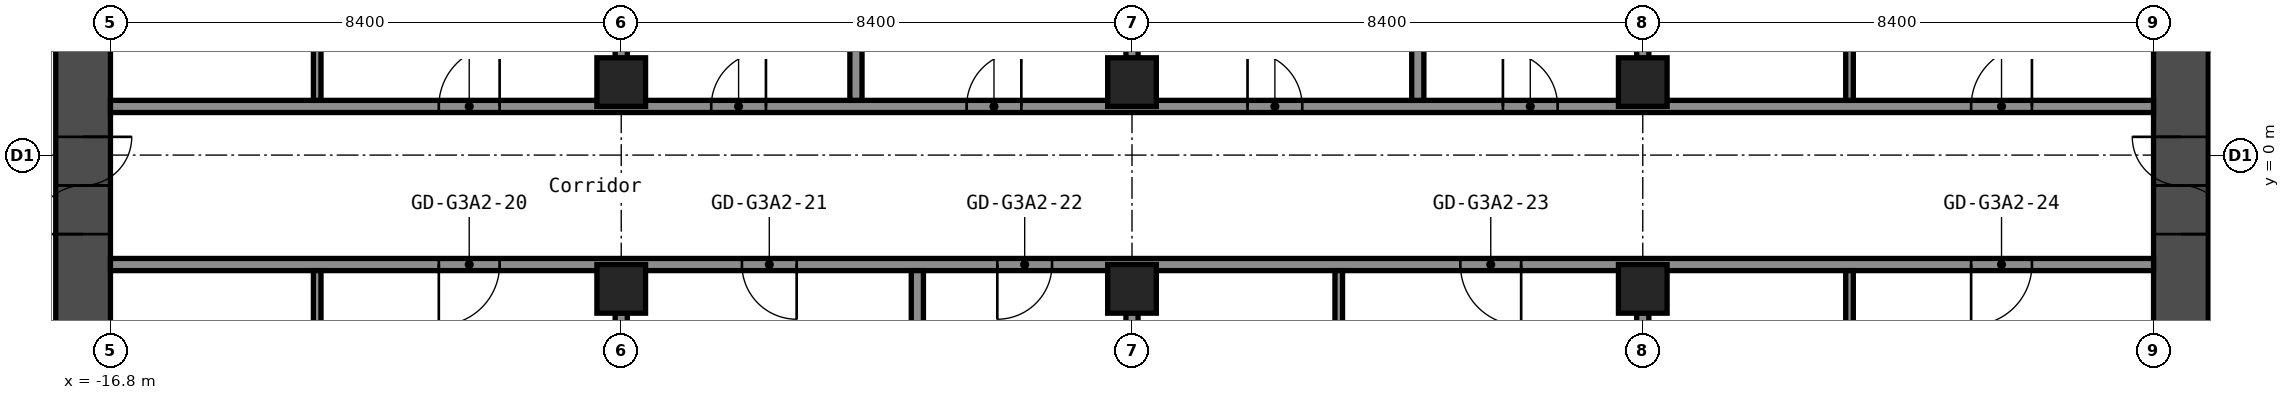
"""IFC4 building model, lengths in metres.
Left out: names, types, materials, properties, quantities, classifications, styles, units other than length and angle.
Written with IfcOpenShell. Run it as: python <this file> out.ifc"""

import sys

from ifc_helpers import new_model, si_unit, direction, frame, frame_2d, origin, origin_2d, place, context, subcontext, project, spatial, rectangle, hollow_rectangle, extrude, element, fill, save


model = new_model("IFC4")
c1 = context("Model", 3, precision=1e-05, world=origin(), true_north=direction((0.0, 1.0)))
c2 = subcontext(c1, "Body", "Model", "MODEL_VIEW")
j1 = project(units=[si_unit("LENGTHUNIT", "METRE"), si_unit("PLANEANGLEUNIT", "RADIAN")], contexts=[c1])
p1 = place(None, origin())
s1 = spatial("IfcSite", under=j1, at=p1, CompositionType="ELEMENT")
p2 = place(p1, origin())
s2 = spatial("IfcBuilding", under=s1, at=p2, CompositionType="ELEMENT")
p3 = place(p2, frame((0.0, 0.0, 163.0)))
s3 = spatial("IfcBuildingStorey", under=s2, at=p3, CompositionType="ELEMENT", Elevation=163.0)
for number, where, z_axis, x_axis in (
    (1, (-8.4, -2.2, 0.0), (0.0, 0.0, 1.0), (1.0, 0.0, 0.0)),
    (2, (-8.4, 1.2, 0.0), (0.0, 0.0, 1.0), (1.0, 0.0, 0.0)),
    (3, (0.0, -2.2, 0.0), (0.0, 0.0, 1.0), (1.0, 0.0, 0.0)),
    (4, (0.0, 1.2, 0.0), (0.0, 0.0, 1.0), (1.0, 0.0, 0.0)),
    (5, (8.4, -2.2, 0.0), (0.0, 0.0, 1.0), (1.0, 0.0, 0.0)),
    (6, (8.4, 1.2, 0.0), (0.0, 0.0, 1.0), (1.0, 0.0, 0.0)),
):
    element("IfcColumn", number, at=place(p3, frame(where, z_axis=z_axis, x_axis=x_axis)), inside=s3, PredefinedType="COLUMN", context=c2, shape_type="SweptSolid", body=[
        extrude(hollow_rectangle(XDim=0.8, YDim=0.8, WallThickness=0.032, at=origin_2d()), origin(), (0.0, 0.0, 1.0), 2.75),
    ])
p4 = place(p3, frame((-17.25, -8.4, 0.0), z_axis=(0.0, 0.0, 1.0), x_axis=(0.0, 1.0, 0.0)))
e7 = element("IfcWall", 7, at=p4, inside=s3, PredefinedType="SHEAR", context=c2, shape_type="SweptSolid", body=[
    extrude(rectangle(XDim=16.8, YDim=0.9, at=frame_2d((8.4, 0.0))), origin(), (0.0, 0.0, 1.0), 2.75),
])
p5 = place(p4, frame((7.1, 0.0, 0.0)))
e8 = element("IfcOpeningElement", 8, at=p5, cuts=e7, PredefinedType="OPENING", context=c2, shape_type="SweptSolid", body=[
    extrude(rectangle(XDim=1.6, YDim=2.1, at=frame_2d((0.8, 1.05))), frame((0.0, 0.46, 0.0), z_axis=(0.0, -1.0, 0.0), x_axis=(1.0, 0.0, 0.0)), (0.0, 0.0, 1.0), 0.92),
])
p6 = place(p3, frame((17.25, -8.4, 0.0), z_axis=(0.0, 0.0, 1.0), x_axis=(0.0, 1.0, 0.0)))
e9 = element("IfcWall", 9, at=p6, inside=s3, PredefinedType="SHEAR", context=c2, shape_type="SweptSolid", body=[
    extrude(rectangle(XDim=16.8, YDim=0.9, at=frame_2d((8.4, 0.0))), origin(), (0.0, 0.0, 1.0), 2.75),
])
p7 = place(p6, frame((7.1, 0.0, 0.0)))
e10 = element("IfcOpeningElement", 10, at=p7, cuts=e9, PredefinedType="OPENING", context=c2, shape_type="SweptSolid", body=[
    extrude(rectangle(XDim=1.6, YDim=2.1, at=frame_2d((0.8, 1.05))), frame((0.0, 0.46, 0.0), z_axis=(0.0, -1.0, 0.0), x_axis=(1.0, 0.0, 0.0)), (0.0, 0.0, 1.0), 0.92),
])
p8 = place(p3, frame((-16.8, -1.8, 0.0), z_axis=(0.0, 0.0, 1.0), x_axis=(1.0, 0.0, 0.0)))
e11 = element("IfcWall", 11, at=p8, inside=s3, PredefinedType="PARTITIONING", context=c2, shape_type="SweptSolid", body=[
    extrude(rectangle(XDim=33.6, YDim=0.2, at=frame_2d((16.8, 0.0))), origin(), (0.0, 0.0, 1.0), 2.75),
])
p9 = place(p8, frame((5.4, 0.0, 0.0)))
e12 = element("IfcOpeningElement", 12, at=p9, cuts=e11, PredefinedType="OPENING", context=c2, shape_type="SweptSolid", body=[
    extrude(rectangle(XDim=1.0, YDim=2.1, at=frame_2d((0.5, 1.05))), frame((0.0, 0.11, 0.0), z_axis=(0.0, -1.0, 0.0), x_axis=(1.0, 0.0, 0.0)), (0.0, 0.0, 1.0), 0.22),
])
p10 = place(p8, frame((10.385, 0.0, 0.0)))
e13 = element("IfcOpeningElement", 13, at=p10, cuts=e11, PredefinedType="OPENING", context=c2, shape_type="SweptSolid", body=[
    extrude(rectangle(XDim=0.9, YDim=2.1, at=frame_2d((0.45, 1.05))), frame((0.0, 0.11, 0.0), z_axis=(0.0, -1.0, 0.0), x_axis=(1.0, 0.0, 0.0)), (0.0, 0.0, 1.0), 0.22),
])
p11 = place(p8, frame((14.585, 0.0, 0.0)))
e14 = element("IfcOpeningElement", 14, at=p11, cuts=e11, PredefinedType="OPENING", context=c2, shape_type="SweptSolid", body=[
    extrude(rectangle(XDim=0.9, YDim=2.1, at=frame_2d((0.45, 1.05))), frame((0.0, 0.11, 0.0), z_axis=(0.0, -1.0, 0.0), x_axis=(1.0, 0.0, 0.0)), (0.0, 0.0, 1.0), 0.22),
])
p12 = place(p8, frame((22.2, 0.0, 0.0)))
e15 = element("IfcOpeningElement", 15, at=p12, cuts=e11, PredefinedType="OPENING", context=c2, shape_type="SweptSolid", body=[
    extrude(rectangle(XDim=1.0, YDim=2.1, at=frame_2d((0.5, 1.05))), frame((0.0, 0.11, 0.0), z_axis=(0.0, -1.0, 0.0), x_axis=(1.0, 0.0, 0.0)), (0.0, 0.0, 1.0), 0.22),
])
p13 = place(p8, frame((30.6, 0.0, 0.0)))
e16 = element("IfcOpeningElement", 16, at=p13, cuts=e11, PredefinedType="OPENING", context=c2, shape_type="SweptSolid", body=[
    extrude(rectangle(XDim=1.0, YDim=2.1, at=frame_2d((0.5, 1.05))), frame((0.0, 0.11, 0.0), z_axis=(0.0, -1.0, 0.0), x_axis=(1.0, 0.0, 0.0)), (0.0, 0.0, 1.0), 0.22),
])
p14 = place(p3, frame((-16.8, 0.8, 0.0), z_axis=(0.0, 0.0, 1.0), x_axis=(1.0, 0.0, 0.0)))
e17 = element("IfcWall", 17, at=p14, inside=s3, PredefinedType="PARTITIONING", context=c2, shape_type="SweptSolid", body=[
    extrude(rectangle(XDim=33.6, YDim=0.2, at=frame_2d((16.8, 0.0))), origin(), (0.0, 0.0, 1.0), 2.75),
])
p15 = place(p14, frame((5.4, 0.0, 0.0)))
e18 = element("IfcOpeningElement", 18, at=p15, cuts=e17, PredefinedType="OPENING", context=c2, shape_type="SweptSolid", body=[
    extrude(rectangle(XDim=1.0, YDim=2.1, at=frame_2d((0.5, 1.05))), frame((0.0, 0.11, 0.0), z_axis=(0.0, -1.0, 0.0), x_axis=(1.0, 0.0, 0.0)), (0.0, 0.0, 1.0), 0.22),
])
p16 = place(p14, frame((9.88, 0.0, 0.0)))
e19 = element("IfcOpeningElement", 19, at=p16, cuts=e17, PredefinedType="OPENING", context=c2, shape_type="SweptSolid", body=[
    extrude(rectangle(XDim=0.9, YDim=2.1, at=frame_2d((0.45, 1.05))), frame((0.0, 0.11, 0.0), z_axis=(0.0, -1.0, 0.0), x_axis=(1.0, 0.0, 0.0)), (0.0, 0.0, 1.0), 0.22),
])
p17 = place(p14, frame((14.08, 0.0, 0.0)))
e20 = element("IfcOpeningElement", 20, at=p17, cuts=e17, PredefinedType="OPENING", context=c2, shape_type="SweptSolid", body=[
    extrude(rectangle(XDim=0.9, YDim=2.1, at=frame_2d((0.45, 1.05))), frame((0.0, 0.11, 0.0), z_axis=(0.0, -1.0, 0.0), x_axis=(1.0, 0.0, 0.0)), (0.0, 0.0, 1.0), 0.22),
])
p18 = place(p14, frame((18.7, 0.0, 0.0)))
e21 = element("IfcOpeningElement", 21, at=p18, cuts=e17, PredefinedType="OPENING", context=c2, shape_type="SweptSolid", body=[
    extrude(rectangle(XDim=0.9, YDim=2.1, at=frame_2d((0.45, 1.05))), frame((0.0, 0.11, 0.0), z_axis=(0.0, -1.0, 0.0), x_axis=(1.0, 0.0, 0.0)), (0.0, 0.0, 1.0), 0.22),
])
p19 = place(p14, frame((22.9, 0.0, 0.0)))
e22 = element("IfcOpeningElement", 22, at=p19, cuts=e17, PredefinedType="OPENING", context=c2, shape_type="SweptSolid", body=[
    extrude(rectangle(XDim=0.9, YDim=2.1, at=frame_2d((0.45, 1.05))), frame((0.0, 0.11, 0.0), z_axis=(0.0, -1.0, 0.0), x_axis=(1.0, 0.0, 0.0)), (0.0, 0.0, 1.0), 0.22),
])
p20 = place(p14, frame((30.6, 0.0, 0.0)))
e23 = element("IfcOpeningElement", 23, at=p20, cuts=e17, PredefinedType="OPENING", context=c2, shape_type="SweptSolid", body=[
    extrude(rectangle(XDim=1.0, YDim=2.1, at=frame_2d((0.5, 1.05))), frame((0.0, 0.11, 0.0), z_axis=(0.0, -1.0, 0.0), x_axis=(1.0, 0.0, 0.0)), (0.0, 0.0, 1.0), 0.22),
])
for number, where, z_axis, x_axis in (
    (24, (-13.4, -5.2, 0.0), (0.0, 0.0, 1.0), (0.0, 1.0, 0.0)),
    (25, (-13.4, 0.9, 0.0), (0.0, 0.0, 1.0), (0.0, 1.0, 0.0)),
):
    element("IfcWall", number, at=place(p3, frame(where, z_axis=z_axis, x_axis=x_axis)), inside=s3, PredefinedType="PARTITIONING", context=c2, shape_type="SweptSolid", body=[
        extrude(rectangle(XDim=3.3, YDim=0.125, at=frame_2d((1.65, 0.0))), origin(), (0.0, 0.0, 1.0), 2.75),
    ])
for number, where, z_axis, x_axis in (
    (26, (-8.4, -19.3, 0.0), (0.0, 0.0, 1.0), (0.0, 1.0, 0.0)),
    (27, (-8.4, 1.59, 0.0), (0.0, 0.0, 1.0), (0.0, 1.0, 0.0)),
):
    element("IfcWall", number, at=place(p3, frame(where, z_axis=z_axis, x_axis=x_axis)), inside=s3, PredefinedType="PARTITIONING", context=c2, shape_type="SweptSolid", body=[
        extrude(rectangle(XDim=16.71, YDim=0.2, at=frame_2d((8.355, 0.0))), origin(), (0.0, 0.0, 1.0), 2.75),
    ])
for number, where, z_axis, x_axis in (
    (28, (-4.54, 0.9, 0.0), (0.0, 0.0, 1.0), (0.0, 1.0, 0.0)),
    (29, (-3.53, -19.3, 0.0), (0.0, 0.0, 1.0), (0.0, 1.0, 0.0)),
):
    element("IfcWall", number, at=place(p3, frame(where, z_axis=z_axis, x_axis=x_axis)), inside=s3, PredefinedType="PARTITIONING", context=c2, shape_type="SweptSolid", body=[
        extrude(rectangle(XDim=17.4, YDim=0.2, at=frame_2d((8.7, 0.0))), origin(), (0.0, 0.0, 1.0), 2.75),
    ])
for number, where, z_axis, x_axis in (
    (30, (0.0, -19.3, 0.0), (0.0, 0.0, 1.0), (0.0, 1.0, 0.0)),
    (31, (0.0, 1.59, 0.0), (0.0, 0.0, 1.0), (0.0, 1.0, 0.0)),
):
    element("IfcWall", number, at=place(p3, frame(where, z_axis=z_axis, x_axis=x_axis)), inside=s3, PredefinedType="PARTITIONING", context=c2, shape_type="SweptSolid", body=[
        extrude(rectangle(XDim=16.71, YDim=0.2, at=frame_2d((8.355, 0.0))), origin(), (0.0, 0.0, 1.0), 2.75),
    ])
p21 = place(p3, frame((3.4, -5.2, 0.0), z_axis=(0.0, 0.0, 1.0), x_axis=(0.0, 1.0, 0.0)))
e32 = element("IfcWall", 32, at=p21, inside=s3, PredefinedType="PARTITIONING", context=c2, shape_type="SweptSolid", body=[
    extrude(rectangle(XDim=3.3, YDim=0.125, at=frame_2d((1.65, 0.0))), origin(), (0.0, 0.0, 1.0), 2.75),
])
p22 = place(p3, frame((4.7, 0.9, 0.0), z_axis=(0.0, 0.0, 1.0), x_axis=(0.0, 1.0, 0.0)))
e33 = element("IfcWall", 33, at=p22, inside=s3, PredefinedType="PARTITIONING", context=c2, shape_type="SweptSolid", body=[
    extrude(rectangle(XDim=17.4, YDim=0.2, at=frame_2d((8.7, 0.0))), origin(), (0.0, 0.0, 1.0), 2.75),
])
for number, where, z_axis, x_axis in (
    (34, (8.4, -19.3, 0.0), (0.0, 0.0, 1.0), (0.0, 1.0, 0.0)),
    (35, (8.4, 1.59, 0.0), (0.0, 0.0, 1.0), (0.0, 1.0, 0.0)),
):
    element("IfcWall", number, at=place(p3, frame(where, z_axis=z_axis, x_axis=x_axis)), inside=s3, PredefinedType="PARTITIONING", context=c2, shape_type="SweptSolid", body=[
        extrude(rectangle(XDim=16.71, YDim=0.2, at=frame_2d((8.355, 0.0))), origin(), (0.0, 0.0, 1.0), 2.75),
    ])
for number, where, z_axis, x_axis in (
    (36, (11.8, -5.2, 0.0), (0.0, 0.0, 1.0), (0.0, 1.0, 0.0)),
    (37, (11.8, 0.9, 0.0), (0.0, 0.0, 1.0), (0.0, 1.0, 0.0)),
):
    element("IfcWall", number, at=place(p3, frame(where, z_axis=z_axis, x_axis=x_axis)), inside=s3, PredefinedType="PARTITIONING", context=c2, shape_type="SweptSolid", body=[
        extrude(rectangle(XDim=3.3, YDim=0.125, at=frame_2d((1.65, 0.0))), origin(), (0.0, 0.0, 1.0), 2.75),
    ])
p23 = place(p5, origin())
e38 = element("IfcDoor", 38, at=p23, inside=s3, OperationType="DOUBLE_DOOR_SINGLE_SWING", PredefinedType="DOOR", context=c2, shape_type="SweptSolid", body=[
    extrude(rectangle(XDim=1.6, YDim=2.1, at=frame_2d((0.8, 1.05))), frame((0.0, 0.025, 0.0), z_axis=(0.0, -1.0, 0.0), x_axis=(1.0, 0.0, 0.0)), (0.0, 0.0, 1.0), 0.05),
])
fill(e8, e38)
p24 = place(p7, origin())
e39 = element("IfcDoor", 39, at=p24, inside=s3, OperationType="DOUBLE_DOOR_SINGLE_SWING", PredefinedType="DOOR", context=c2, shape_type="SweptSolid", body=[
    extrude(rectangle(XDim=1.6, YDim=2.1, at=frame_2d((0.8, 1.05))), frame((0.0, 0.025, 0.0), z_axis=(0.0, -1.0, 0.0), x_axis=(1.0, 0.0, 0.0)), (0.0, 0.0, 1.0), 0.05),
])
fill(e10, e39)
p25 = place(p9, origin())
e40 = element("IfcDoor", 40, at=p25, inside=s3, OperationType="SINGLE_SWING_LEFT", PredefinedType="DOOR", context=c2, shape_type="SweptSolid", body=[
    extrude(rectangle(XDim=1.0, YDim=2.1, at=frame_2d((0.5, 1.05))), frame((0.0, 0.025, 0.0), z_axis=(0.0, -1.0, 0.0), x_axis=(1.0, 0.0, 0.0)), (0.0, 0.0, 1.0), 0.05),
])
fill(e12, e40)
p26 = place(p10, origin())
e41 = element("IfcDoor", 41, at=p26, inside=s3, OperationType="SINGLE_SWING_RIGHT", PredefinedType="DOOR", context=c2, shape_type="SweptSolid", body=[
    extrude(rectangle(XDim=0.9, YDim=2.1, at=frame_2d((0.45, 1.05))), frame((0.0, 0.025, 0.0), z_axis=(0.0, -1.0, 0.0), x_axis=(1.0, 0.0, 0.0)), (0.0, 0.0, 1.0), 0.05),
])
fill(e13, e41)
p27 = place(p11, origin())
e42 = element("IfcDoor", 42, at=p27, inside=s3, OperationType="SINGLE_SWING_LEFT", PredefinedType="DOOR", context=c2, shape_type="SweptSolid", body=[
    extrude(rectangle(XDim=0.9, YDim=2.1, at=frame_2d((0.45, 1.05))), frame((0.0, 0.025, 0.0), z_axis=(0.0, -1.0, 0.0), x_axis=(1.0, 0.0, 0.0)), (0.0, 0.0, 1.0), 0.05),
])
fill(e14, e42)
p28 = place(p12, origin())
e43 = element("IfcDoor", 43, at=p28, inside=s3, OperationType="SINGLE_SWING_RIGHT", PredefinedType="DOOR", context=c2, shape_type="SweptSolid", body=[
    extrude(rectangle(XDim=1.0, YDim=2.1, at=frame_2d((0.5, 1.05))), frame((0.0, 0.025, 0.0), z_axis=(0.0, -1.0, 0.0), x_axis=(1.0, 0.0, 0.0)), (0.0, 0.0, 1.0), 0.05),
])
fill(e15, e43)
p29 = place(p13, origin())
e44 = element("IfcDoor", 44, at=p29, inside=s3, OperationType="SINGLE_SWING_LEFT", PredefinedType="DOOR", context=c2, shape_type="SweptSolid", body=[
    extrude(rectangle(XDim=1.0, YDim=2.1, at=frame_2d((0.5, 1.05))), frame((0.0, 0.025, 0.0), z_axis=(0.0, -1.0, 0.0), x_axis=(1.0, 0.0, 0.0)), (0.0, 0.0, 1.0), 0.05),
])
fill(e16, e44)
p30 = place(p15, origin())
e45 = element("IfcDoor", 45, at=p30, inside=s3, OperationType="SINGLE_SWING_LEFT", PredefinedType="DOOR", context=c2, shape_type="SweptSolid", body=[
    extrude(rectangle(XDim=1.0, YDim=2.1, at=frame_2d((0.5, 1.05))), frame((0.0, 0.025, 0.0), z_axis=(0.0, -1.0, 0.0), x_axis=(1.0, 0.0, 0.0)), (0.0, 0.0, 1.0), 0.05),
])
fill(e18, e45)
p31 = place(p16, origin())
e46 = element("IfcDoor", 46, at=p31, inside=s3, OperationType="SINGLE_SWING_LEFT", PredefinedType="DOOR", context=c2, shape_type="SweptSolid", body=[
    extrude(rectangle(XDim=0.9, YDim=2.1, at=frame_2d((0.45, 1.05))), frame((0.0, 0.025, 0.0), z_axis=(0.0, -1.0, 0.0), x_axis=(1.0, 0.0, 0.0)), (0.0, 0.0, 1.0), 0.05),
])
fill(e19, e46)
p32 = place(p17, origin())
e47 = element("IfcDoor", 47, at=p32, inside=s3, OperationType="SINGLE_SWING_LEFT", PredefinedType="DOOR", context=c2, shape_type="SweptSolid", body=[
    extrude(rectangle(XDim=0.9, YDim=2.1, at=frame_2d((0.45, 1.05))), frame((0.0, 0.025, 0.0), z_axis=(0.0, -1.0, 0.0), x_axis=(1.0, 0.0, 0.0)), (0.0, 0.0, 1.0), 0.05),
])
fill(e20, e47)
p33 = place(p18, origin())
e48 = element("IfcDoor", 48, at=p33, inside=s3, OperationType="SINGLE_SWING_RIGHT", PredefinedType="DOOR", context=c2, shape_type="SweptSolid", body=[
    extrude(rectangle(XDim=0.9, YDim=2.1, at=frame_2d((0.45, 1.05))), frame((0.0, 0.025, 0.0), z_axis=(0.0, -1.0, 0.0), x_axis=(1.0, 0.0, 0.0)), (0.0, 0.0, 1.0), 0.05),
])
fill(e21, e48)
p34 = place(p19, origin())
e49 = element("IfcDoor", 49, at=p34, inside=s3, OperationType="SINGLE_SWING_RIGHT", PredefinedType="DOOR", context=c2, shape_type="SweptSolid", body=[
    extrude(rectangle(XDim=0.9, YDim=2.1, at=frame_2d((0.45, 1.05))), frame((0.0, 0.025, 0.0), z_axis=(0.0, -1.0, 0.0), x_axis=(1.0, 0.0, 0.0)), (0.0, 0.0, 1.0), 0.05),
])
fill(e22, e49)
p35 = place(p20, origin())
e50 = element("IfcDoor", 50, at=p35, inside=s3, OperationType="SINGLE_SWING_LEFT", PredefinedType="DOOR", context=c2, shape_type="SweptSolid", body=[
    extrude(rectangle(XDim=1.0, YDim=2.1, at=frame_2d((0.5, 1.05))), frame((0.0, 0.025, 0.0), z_axis=(0.0, -1.0, 0.0), x_axis=(1.0, 0.0, 0.0)), (0.0, 0.0, 1.0), 0.05),
])
fill(e23, e50)
save(model, sys.argv[1])
